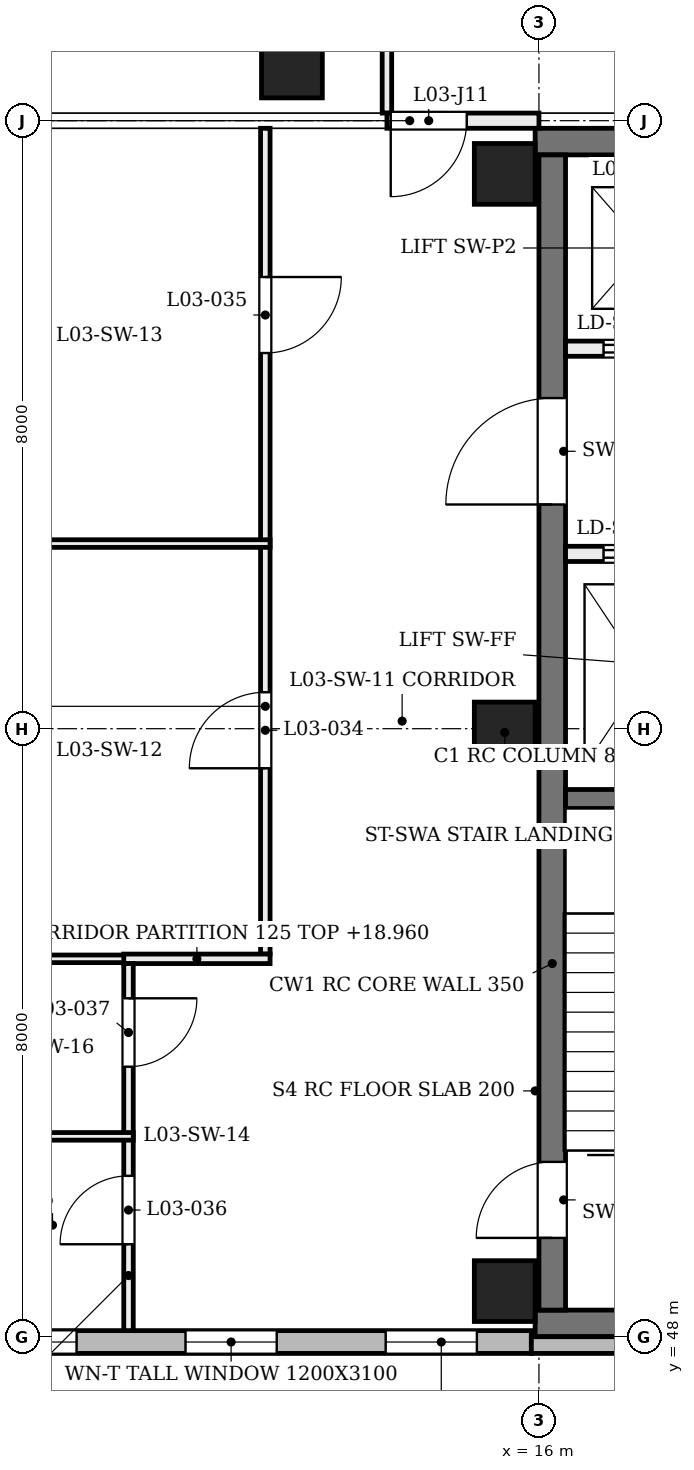
"""IFC4 building model, lengths in metres.
Left out: names, types, materials, properties, quantities, classifications, styles, units other than length and angle.
Written with IfcOpenShell. Run it as: python <this file> out.ifc"""

import sys

from ifc_helpers import new_model, si_unit, direction, frame, frame_2d, origin, origin_2d, place, context, subcontext, project, spatial, rectangle, extrude, element, fill, save


model = new_model("IFC4")
c1 = context("Model", 3, precision=1e-05, world=origin(), true_north=direction((0.0, 1.0)))
c2 = subcontext(c1, "Body", "Model", "MODEL_VIEW")
j1 = project(units=[si_unit("LENGTHUNIT", "METRE"), si_unit("PLANEANGLEUNIT", "RADIAN")], contexts=[c1])
p1 = place(None, origin())
s1 = spatial("IfcSite", under=j1, at=p1, CompositionType="ELEMENT")
p2 = place(p1, origin())
s2 = spatial("IfcBuilding", under=s1, at=p2, CompositionType="ELEMENT")
p3 = place(p2, frame((0.0, 0.0, 14.4)))
s3 = spatial("IfcBuildingStorey", under=s2, at=p3, CompositionType="ELEMENT", Elevation=14.4)
for number, where, z_axis, x_axis in (
    (1, (15.95, 48.175, 0.0), (0.0, 0.0, 1.0), (1.0, 0.0, 0.0)),
    (2, (15.95, 63.725, 0.0), (0.0, 0.0, 1.0), (1.0, 0.0, 0.0)),
):
    element("IfcWall", number, at=place(p3, frame(where, z_axis=z_axis, x_axis=x_axis)), inside=s3, PredefinedType="SHEAR", context=c2, shape_type="SweptSolid", body=[
        extrude(rectangle(XDim=7.95, YDim=0.35, at=frame_2d((3.975, 0.0))), origin(), (0.0, 0.0, 1.0), 4.58),
    ])
p4 = place(p3, frame((16.175, 48.35, 0.0), z_axis=(0.0, 0.0, 1.0), x_axis=(0.0, 1.0, 0.0)))
e3 = element("IfcWall", 3, at=p4, inside=s3, PredefinedType="SHEAR", context=c2, shape_type="SweptSolid", body=[
    extrude(rectangle(XDim=15.2, YDim=0.35, at=frame_2d((7.6, 0.0))), origin(), (0.0, 0.0, 1.0), 4.58),
])
p5 = place(p4, frame((0.95, 0.0, 0.0)))
e4 = element("IfcOpeningElement", 4, at=p5, cuts=e3, PredefinedType="OPENING", context=c2, shape_type="SweptSolid", body=[
    extrude(rectangle(XDim=1.0, YDim=2.1, at=frame_2d((0.5, 1.05))), frame((0.0, 0.185, 0.0), z_axis=(0.0, -1.0, 0.0), x_axis=(1.0, 0.0, 0.0)), (0.0, 0.0, 1.0), 0.37),
])
p6 = place(p4, frame((10.6, 0.0, 0.0)))
e5 = element("IfcOpeningElement", 5, at=p6, cuts=e3, PredefinedType="OPENING", context=c2, shape_type="SweptSolid", body=[
    extrude(rectangle(XDim=1.4, YDim=2.1, at=frame_2d((0.7, 1.05))), frame((0.0, 0.185, 0.0), z_axis=(0.0, -1.0, 0.0), x_axis=(1.0, 0.0, 0.0)), (0.0, 0.0, 1.0), 0.37),
])
for number, where, z_axis, x_axis in (
    (6, (15.55, 48.6, 0.0), (0.0, 0.0, 1.0), (1.0, 0.0, 0.0)),
    (7, (15.55, 55.95, 0.0), (0.0, 0.0, 1.0), (1.0, 0.0, 0.0)),
    (8, (15.55, 63.3, 0.0), (0.0, 0.0, 1.0), (1.0, 0.0, 0.0)),
):
    element("IfcColumn", number, at=place(p3, frame(where, z_axis=z_axis, x_axis=x_axis)), inside=s3, PredefinedType="COLUMN", context=c2, shape_type="SweptSolid", body=[
        extrude(rectangle(XDim=0.8, YDim=0.8, at=origin_2d()), origin(), (0.0, 0.0, 1.0), 4.8),
    ])
p7 = place(p3, frame((13.0, 64.7, 0.0), z_axis=(-0.203952265704, 0.0, 0.978980833987), x_axis=(0.0, -1.0, 0.0)))
e9 = element("IfcColumn", 9, at=p7, inside=s3, PredefinedType="COLUMN", context=c2, shape_type="SweptSolid", body=[
    extrude(rectangle(XDim=0.8, YDim=0.8, at=origin_2d()), origin(), (0.0, 0.0, 1.0), 4.903),
])
p8 = place(p3, frame((8.0, 47.93, 0.0), z_axis=(0.0, 0.0, 1.0), x_axis=(1.0, 0.0, 0.0)))
e10 = element("IfcWall", 10, at=p8, inside=s3, PredefinedType="SOLIDWALL", context=c2, shape_type="SweptSolid", body=[
    extrude(rectangle(XDim=7.9, YDim=0.3, at=frame_2d((3.95, 0.0))), origin(), (0.0, 0.0, 1.0), 3.9),
])
p9 = place(p8, frame((0.717, 0.0, 0.75)))
e11 = element("IfcOpeningElement", 11, at=p9, cuts=e10, PredefinedType="OPENING", context=c2, shape_type="SweptSolid", body=[
    extrude(rectangle(XDim=1.2, YDim=3.1, at=frame_2d((0.6, 1.55))), frame((0.0, 0.16, 0.0), z_axis=(0.0, -1.0, 0.0), x_axis=(1.0, 0.0, 0.0)), (0.0, 0.0, 1.0), 0.32),
])
p10 = place(p8, frame((3.35, 0.0, 0.75)))
e12 = element("IfcOpeningElement", 12, at=p10, cuts=e10, PredefinedType="OPENING", context=c2, shape_type="SweptSolid", body=[
    extrude(rectangle(XDim=1.2, YDim=3.1, at=frame_2d((0.6, 1.55))), frame((0.0, 0.16, 0.0), z_axis=(0.0, -1.0, 0.0), x_axis=(1.0, 0.0, 0.0)), (0.0, 0.0, 1.0), 0.32),
])
p11 = place(p8, frame((5.983, 0.0, 0.75)))
e13 = element("IfcOpeningElement", 13, at=p11, cuts=e10, PredefinedType="OPENING", context=c2, shape_type="SweptSolid", body=[
    extrude(rectangle(XDim=1.2, YDim=3.1, at=frame_2d((0.6, 1.55))), frame((0.0, 0.16, 0.0), z_axis=(0.0, -1.0, 0.0), x_axis=(1.0, 0.0, 0.0)), (0.0, 0.0, 1.0), 0.32),
])
p12 = place(p3, frame((15.9, 47.89, 0.0), z_axis=(0.0, 0.0, 1.0), x_axis=(1.0, 0.0, 0.0)))
e14 = element("IfcWall", 14, at=p12, inside=s3, PredefinedType="SOLIDWALL", context=c2, shape_type="SweptSolid", body=[
    extrude(rectangle(XDim=8.2, YDim=0.22, at=frame_2d((4.1, 0.0))), origin(), (0.0, 0.0, 1.0), 3.9),
])
p13 = place(p12, frame((1.108, 0.0, 0.9)))
e15 = element("IfcOpeningElement", 15, at=p13, cuts=e14, PredefinedType="OPENING", context=c2, shape_type="SweptSolid", body=[
    extrude(rectangle(XDim=0.45, YDim=2.6, at=frame_2d((0.225, 1.3))), frame((0.0, 0.12, 0.0), z_axis=(0.0, -1.0, 0.0), x_axis=(1.0, 0.0, 0.0)), (0.0, 0.0, 1.0), 0.24),
])
p14 = place(p12, frame((3.775, 0.0, 0.9)))
e16 = element("IfcOpeningElement", 16, at=p14, cuts=e14, PredefinedType="OPENING", context=c2, shape_type="SweptSolid", body=[
    extrude(rectangle(XDim=0.45, YDim=2.6, at=frame_2d((0.225, 1.3))), frame((0.0, 0.12, 0.0), z_axis=(0.0, -1.0, 0.0), x_axis=(1.0, 0.0, 0.0)), (0.0, 0.0, 1.0), 0.24),
])
p15 = place(p12, frame((6.442, 0.0, 0.9)))
e17 = element("IfcOpeningElement", 17, at=p15, cuts=e14, PredefinedType="OPENING", context=c2, shape_type="SweptSolid", body=[
    extrude(rectangle(XDim=0.45, YDim=2.6, at=frame_2d((0.225, 1.3))), frame((0.0, 0.12, 0.0), z_axis=(0.0, -1.0, 0.0), x_axis=(1.0, 0.0, 0.0)), (0.0, 0.0, 1.0), 0.24),
])
p16 = place(p3, frame((16.35, 55.075, 0.0), z_axis=(0.0, 0.0, 1.0), x_axis=(1.0, 0.0, 0.0)))
e18 = element("IfcWall", 18, at=p16, inside=s3, PredefinedType="SOLIDWALL", context=c2, shape_type="SweptSolid", body=[
    extrude(rectangle(XDim=3.1, YDim=0.25, at=frame_2d((1.55, 0.0))), origin(), (0.0, 0.0, 1.0), 4.55),
])
p17 = place(p3, frame((16.35, 58.3, 0.0), z_axis=(0.0, 0.0, 1.0), x_axis=(1.0, 0.0, 0.0)))
e19 = element("IfcWall", 19, at=p17, inside=s3, PredefinedType="SOLIDWALL", context=c2, shape_type="SweptSolid", body=[
    extrude(rectangle(XDim=7.2, YDim=0.2, at=frame_2d((3.6, 0.0))), origin(), (0.0, 0.0, 1.0), 4.55),
])
p18 = place(p17, frame((0.5, 0.0, 0.0)))
e20 = element("IfcOpeningElement", 20, at=p18, cuts=e19, PredefinedType="OPENING", context=c2, shape_type="SweptSolid", body=[
    extrude(rectangle(XDim=1.1, YDim=2.1, at=frame_2d((0.55, 1.05))), frame((0.0, 0.11, 0.0), z_axis=(0.0, -1.0, 0.0), x_axis=(1.0, 0.0, 0.0)), (0.0, 0.0, 1.0), 0.22),
])
p19 = place(p17, frame((5.6, 0.0, 0.0)))
e21 = element("IfcOpeningElement", 21, at=p19, cuts=e19, PredefinedType="OPENING", context=c2, shape_type="SweptSolid", body=[
    extrude(rectangle(XDim=1.1, YDim=2.1, at=frame_2d((0.55, 1.05))), frame((0.0, 0.11, 0.0), z_axis=(0.0, -1.0, 0.0), x_axis=(1.0, 0.0, 0.0)), (0.0, 0.0, 1.0), 0.22),
])
p20 = place(p17, frame((3.1, 0.0, 0.0)))
e22 = element("IfcOpeningElement", 22, at=p20, cuts=e19, PredefinedType="OPENING", context=c2, shape_type="SweptSolid", body=[
    extrude(rectangle(XDim=1.0, YDim=2.1, at=frame_2d((0.5, 1.05))), frame((0.0, 0.11, 0.0), z_axis=(0.0, -1.0, 0.0), x_axis=(1.0, 0.0, 0.0)), (0.0, 0.0, 1.0), 0.22),
])
p21 = place(p3, frame((16.35, 61.0, 0.0), z_axis=(0.0, 0.0, 1.0), x_axis=(1.0, 0.0, 0.0)))
e23 = element("IfcWall", 23, at=p21, inside=s3, PredefinedType="SOLIDWALL", context=c2, shape_type="SweptSolid", body=[
    extrude(rectangle(XDim=7.2, YDim=0.2, at=frame_2d((3.6, 0.0))), origin(), (0.0, 0.0, 1.0), 4.55),
])
p22 = place(p21, frame((0.5, 0.0, 0.0)))
e24 = element("IfcOpeningElement", 24, at=p22, cuts=e23, PredefinedType="OPENING", context=c2, shape_type="SweptSolid", body=[
    extrude(rectangle(XDim=1.1, YDim=2.1, at=frame_2d((0.55, 1.05))), frame((0.0, 0.11, 0.0), z_axis=(0.0, -1.0, 0.0), x_axis=(1.0, 0.0, 0.0)), (0.0, 0.0, 1.0), 0.22),
])
p23 = place(p21, frame((5.6, 0.0, 0.0)))
e25 = element("IfcOpeningElement", 25, at=p23, cuts=e23, PredefinedType="OPENING", context=c2, shape_type="SweptSolid", body=[
    extrude(rectangle(XDim=1.1, YDim=2.1, at=frame_2d((0.55, 1.05))), frame((0.0, 0.11, 0.0), z_axis=(0.0, -1.0, 0.0), x_axis=(1.0, 0.0, 0.0)), (0.0, 0.0, 1.0), 0.22),
])
p24 = place(p21, frame((3.1, 0.0, 0.0)))
e26 = element("IfcOpeningElement", 26, at=p24, cuts=e23, PredefinedType="OPENING", context=c2, shape_type="SweptSolid", body=[
    extrude(rectangle(XDim=1.0, YDim=2.1, at=frame_2d((0.5, 1.05))), frame((0.0, 0.11, 0.0), z_axis=(0.0, -1.0, 0.0), x_axis=(1.0, 0.0, 0.0)), (0.0, 0.0, 1.0), 0.22),
])
p25 = place(p3, frame((14.0, 64.1, 0.0), z_axis=(0.0, 0.0, 1.0), x_axis=(0.0, 1.0, 0.0)))
e27 = element("IfcWall", 27, at=p25, inside=s3, PredefinedType="PARTITIONING", context=c2, shape_type="SweptSolid", body=[
    extrude(rectangle(XDim=4.037, YDim=0.125, at=frame_2d((2.019, 0.0))), origin(), (0.0, 0.0, 1.0), 3.88),
])
p26 = place(p25, frame((1.75, 0.0, 0.0)))
e28 = element("IfcOpeningElement", 28, at=p26, cuts=e27, PredefinedType="OPENING", context=c2, shape_type="SweptSolid", body=[
    extrude(rectangle(XDim=1.15, YDim=2.1, at=frame_2d((0.575, 1.05))), frame((0.0, 0.073, 0.0), z_axis=(0.0, -1.0, 0.0), x_axis=(1.0, 0.0, 0.0)), (0.0, 0.0, 1.0), 0.145),
])
p27 = place(p3, frame((12.4, 53.035, 0.0), z_axis=(0.0, 0.0, 1.0), x_axis=(0.0, 1.0, 0.0)))
e29 = element("IfcWall", 29, at=p27, inside=s3, PredefinedType="PARTITIONING", context=c2, shape_type="SweptSolid", body=[
    extrude(rectangle(XDim=10.865, YDim=0.125, at=frame_2d((5.433, 0.0))), origin(), (0.0, 0.0, 1.0), 3.88),
])
p28 = place(p27, frame((2.444, 0.0, 0.0)))
e30 = element("IfcOpeningElement", 30, at=p28, cuts=e29, PredefinedType="OPENING", context=c2, shape_type="SweptSolid", body=[
    extrude(rectangle(XDim=1.0, YDim=2.1, at=frame_2d((0.5, 1.05))), frame((0.0, 0.073, 0.0), z_axis=(0.0, -1.0, 0.0), x_axis=(1.0, 0.0, 0.0)), (0.0, 0.0, 1.0), 0.145),
])
p29 = place(p27, frame((7.908, 0.0, 0.0)))
e31 = element("IfcOpeningElement", 31, at=p29, cuts=e29, PredefinedType="OPENING", context=c2, shape_type="SweptSolid", body=[
    extrude(rectangle(XDim=1.0, YDim=2.1, at=frame_2d((0.5, 1.05))), frame((0.0, 0.073, 0.0), z_axis=(0.0, -1.0, 0.0), x_axis=(1.0, 0.0, 0.0)), (0.0, 0.0, 1.0), 0.145),
])
p30 = place(p3, frame((8.08, 52.972, 0.0), z_axis=(0.0, 0.0, 1.0), x_axis=(1.0, 0.0, 0.0)))
e32 = element("IfcWall", 32, at=p30, inside=s3, PredefinedType="PARTITIONING", context=c2, shape_type="SweptSolid", body=[
    extrude(rectangle(XDim=2.583, YDim=0.1, at=frame_2d((1.291, 0.0))), origin(), (0.0, 0.0, 1.0), 3.88),
])
p31 = place(p3, frame((10.538, 52.972, 0.0), z_axis=(0.0, 0.0, 1.0), x_axis=(1.0, 0.0, 0.0)))
e33 = element("IfcWall", 33, at=p31, inside=s3, PredefinedType="PARTITIONING", context=c2, shape_type="SweptSolid", body=[
    extrude(rectangle(XDim=1.925, YDim=0.125, at=frame_2d((0.962, 0.0))), origin(), (0.0, 0.0, 1.0), 4.56),
])
p32 = place(p3, frame((8.08, 58.436, 0.0), z_axis=(0.0, 0.0, 1.0), x_axis=(1.0, 0.0, 0.0)))
e34 = element("IfcWall", 34, at=p32, inside=s3, PredefinedType="PARTITIONING", context=c2, shape_type="SweptSolid", body=[
    extrude(rectangle(XDim=4.382, YDim=0.1, at=frame_2d((2.191, 0.0))), origin(), (0.0, 0.0, 1.0), 3.88),
])
p33 = place(p3, frame((10.6, 48.08, 0.0), z_axis=(0.0, 0.0, 1.0), x_axis=(0.0, 1.0, 0.0)))
e35 = element("IfcWall", 35, at=p33, inside=s3, PredefinedType="PARTITIONING", context=c2, shape_type="SweptSolid", body=[
    extrude(rectangle(XDim=4.83, YDim=0.125, at=frame_2d((2.415, 0.0))), origin(), (0.0, 0.0, 1.0), 3.88),
])
p34 = place(p33, frame((1.136, 0.0, 0.0)))
e36 = element("IfcOpeningElement", 36, at=p34, cuts=e35, PredefinedType="OPENING", context=c2, shape_type="SweptSolid", body=[
    extrude(rectangle(XDim=0.9, YDim=2.1, at=frame_2d((0.45, 1.05))), frame((0.0, 0.073, 0.0), z_axis=(0.0, -1.0, 0.0), x_axis=(1.0, 0.0, 0.0)), (0.0, 0.0, 1.0), 0.145),
])
p35 = place(p33, frame((3.473, 0.0, 0.0)))
e37 = element("IfcOpeningElement", 37, at=p35, cuts=e35, PredefinedType="OPENING", context=c2, shape_type="SweptSolid", body=[
    extrude(rectangle(XDim=0.9, YDim=2.1, at=frame_2d((0.45, 1.05))), frame((0.0, 0.073, 0.0), z_axis=(0.0, -1.0, 0.0), x_axis=(1.0, 0.0, 0.0)), (0.0, 0.0, 1.0), 0.145),
])
p36 = place(p3, frame((8.08, 50.636, 0.0), z_axis=(0.0, 0.0, 1.0), x_axis=(1.0, 0.0, 0.0)))
e38 = element("IfcWall", 38, at=p36, inside=s3, PredefinedType="PARTITIONING", context=c2, shape_type="SweptSolid", body=[
    extrude(rectangle(XDim=2.583, YDim=0.1, at=frame_2d((1.291, 0.0))), origin(), (0.0, 0.0, 1.0), 3.88),
])
p37 = place(p3, frame((14.0, 64.0, 0.0), z_axis=(0.0, 0.0, 1.0), x_axis=(1.0, 0.0, 0.0)))
e39 = element("IfcWall", 39, at=p37, inside=s3, PredefinedType="PARTITIONING", context=c2, shape_type="SweptSolid", body=[
    extrude(rectangle(XDim=2.0, YDim=0.2, at=frame_2d((1.0, 0.0))), origin(), (0.0, 0.0, 1.0), 3.88),
])
p38 = place(p37, frame((0.05, 0.0, 0.0)))
e40 = element("IfcOpeningElement", 40, at=p38, cuts=e39, PredefinedType="OPENING", context=c2, shape_type="SweptSolid", body=[
    extrude(rectangle(XDim=1.0, YDim=2.1, at=frame_2d((0.5, 1.05))), frame((0.0, 0.11, 0.0), z_axis=(0.0, -1.0, 0.0), x_axis=(1.0, 0.0, 0.0)), (0.0, 0.0, 1.0), 0.22),
])
p39 = place(p9, origin())
e41 = element("IfcWindow", 41, at=p39, inside=s3, PartitioningType="SINGLE_PANEL", PredefinedType="WINDOW", context=c2, shape_type="SweptSolid", body=[
    extrude(rectangle(XDim=1.2, YDim=3.1, at=frame_2d((0.6, 1.55))), frame((0.0, 0.03, 0.0), z_axis=(0.0, -1.0, 0.0), x_axis=(1.0, 0.0, 0.0)), (0.0, 0.0, 1.0), 0.06),
])
fill(e11, e41)
p40 = place(p10, origin())
e42 = element("IfcWindow", 42, at=p40, inside=s3, PartitioningType="SINGLE_PANEL", PredefinedType="WINDOW", context=c2, shape_type="SweptSolid", body=[
    extrude(rectangle(XDim=1.2, YDim=3.1, at=frame_2d((0.6, 1.55))), frame((0.0, 0.03, 0.0), z_axis=(0.0, -1.0, 0.0), x_axis=(1.0, 0.0, 0.0)), (0.0, 0.0, 1.0), 0.06),
])
fill(e12, e42)
p41 = place(p11, origin())
e43 = element("IfcWindow", 43, at=p41, inside=s3, PartitioningType="SINGLE_PANEL", PredefinedType="WINDOW", context=c2, shape_type="SweptSolid", body=[
    extrude(rectangle(XDim=1.2, YDim=3.1, at=frame_2d((0.6, 1.55))), frame((0.0, 0.03, 0.0), z_axis=(0.0, -1.0, 0.0), x_axis=(1.0, 0.0, 0.0)), (0.0, 0.0, 1.0), 0.06),
])
fill(e13, e43)
p42 = place(p5, origin())
e44 = element("IfcDoor", 44, at=p42, inside=s3, OperationType="SINGLE_SWING_LEFT", PredefinedType="DOOR", context=c2, shape_type="SweptSolid", body=[
    extrude(rectangle(XDim=1.0, YDim=2.1, at=frame_2d((0.5, 1.05))), frame((0.0, 0.025, 0.0), z_axis=(0.0, -1.0, 0.0), x_axis=(1.0, 0.0, 0.0)), (0.0, 0.0, 1.0), 0.05),
])
fill(e4, e44)
p43 = place(p18, origin())
e45 = element("IfcDoor", 45, at=p43, inside=s3, OperationType="DOUBLE_DOOR_SLIDING", PredefinedType="DOOR", context=c2, shape_type="SweptSolid", body=[
    extrude(rectangle(XDim=1.1, YDim=2.1, at=frame_2d((0.55, 1.05))), frame((0.0, 0.025, 0.0), z_axis=(0.0, -1.0, 0.0), x_axis=(1.0, 0.0, 0.0)), (0.0, 0.0, 1.0), 0.05),
])
fill(e20, e45)
p44 = place(p22, frame((1.1, 0.0, 0.0), z_axis=(0.0, 0.0, 1.0), x_axis=(-1.0, 0.0, 0.0)))
e46 = element("IfcDoor", 46, at=p44, inside=s3, OperationType="DOUBLE_DOOR_SLIDING", PredefinedType="DOOR", context=c2, shape_type="SweptSolid", body=[
    extrude(rectangle(XDim=1.1, YDim=2.1, at=frame_2d((0.55, 1.05))), frame((0.0, 0.025, 0.0), z_axis=(0.0, -1.0, 0.0), x_axis=(1.0, 0.0, 0.0)), (0.0, 0.0, 1.0), 0.05),
])
fill(e24, e46)
p45 = place(p6, origin())
e47 = element("IfcDoor", 47, at=p45, inside=s3, OperationType="SINGLE_SWING_LEFT", PredefinedType="DOOR", context=c2, shape_type="SweptSolid", body=[
    extrude(rectangle(XDim=1.4, YDim=2.1, at=frame_2d((0.7, 1.05))), frame((0.0, 0.025, 0.0), z_axis=(0.0, -1.0, 0.0), x_axis=(1.0, 0.0, 0.0)), (0.0, 0.0, 1.0), 0.05),
])
fill(e5, e47)
p46 = place(p28, origin())
e48 = element("IfcDoor", 48, at=p46, inside=s3, OperationType="SINGLE_SWING_LEFT", PredefinedType="DOOR", context=c2, shape_type="SweptSolid", body=[
    extrude(rectangle(XDim=1.0, YDim=2.1, at=frame_2d((0.5, 1.05))), frame((0.0, 0.025, 0.0), z_axis=(0.0, -1.0, 0.0), x_axis=(1.0, 0.0, 0.0)), (0.0, 0.0, 1.0), 0.05),
])
fill(e30, e48)
p47 = place(p29, origin())
e49 = element("IfcDoor", 49, at=p47, inside=s3, OperationType="SINGLE_SWING_RIGHT", PredefinedType="DOOR", context=c2, shape_type="SweptSolid", body=[
    extrude(rectangle(XDim=1.0, YDim=2.1, at=frame_2d((0.5, 1.05))), frame((0.0, 0.025, 0.0), z_axis=(0.0, -1.0, 0.0), x_axis=(1.0, 0.0, 0.0)), (0.0, 0.0, 1.0), 0.05),
])
fill(e31, e49)
p48 = place(p34, origin())
e50 = element("IfcDoor", 50, at=p48, inside=s3, OperationType="SINGLE_SWING_LEFT", PredefinedType="DOOR", context=c2, shape_type="SweptSolid", body=[
    extrude(rectangle(XDim=0.9, YDim=2.1, at=frame_2d((0.45, 1.05))), frame((0.0, 0.025, 0.0), z_axis=(0.0, -1.0, 0.0), x_axis=(1.0, 0.0, 0.0)), (0.0, 0.0, 1.0), 0.05),
])
fill(e36, e50)
p49 = place(p35, origin())
e51 = element("IfcDoor", 51, at=p49, inside=s3, OperationType="SINGLE_SWING_RIGHT", PredefinedType="DOOR", context=c2, shape_type="SweptSolid", body=[
    extrude(rectangle(XDim=0.9, YDim=2.1, at=frame_2d((0.45, 1.05))), frame((0.0, 0.025, 0.0), z_axis=(0.0, -1.0, 0.0), x_axis=(1.0, 0.0, 0.0)), (0.0, 0.0, 1.0), 0.05),
])
fill(e37, e51)
p50 = place(p38, frame((1.0, 0.0, 0.0), z_axis=(0.0, 0.0, 1.0), x_axis=(-1.0, 0.0, 0.0)))
e52 = element("IfcDoor", 52, at=p50, inside=s3, OperationType="SINGLE_SWING_LEFT", PredefinedType="DOOR", context=c2, shape_type="SweptSolid", body=[
    extrude(rectangle(XDim=1.0, YDim=2.1, at=frame_2d((0.5, 1.05))), frame((0.0, 0.025, 0.0), z_axis=(0.0, -1.0, 0.0), x_axis=(1.0, 0.0, 0.0)), (0.0, 0.0, 1.0), 0.05),
])
fill(e40, e52)
save(model, sys.argv[1])
